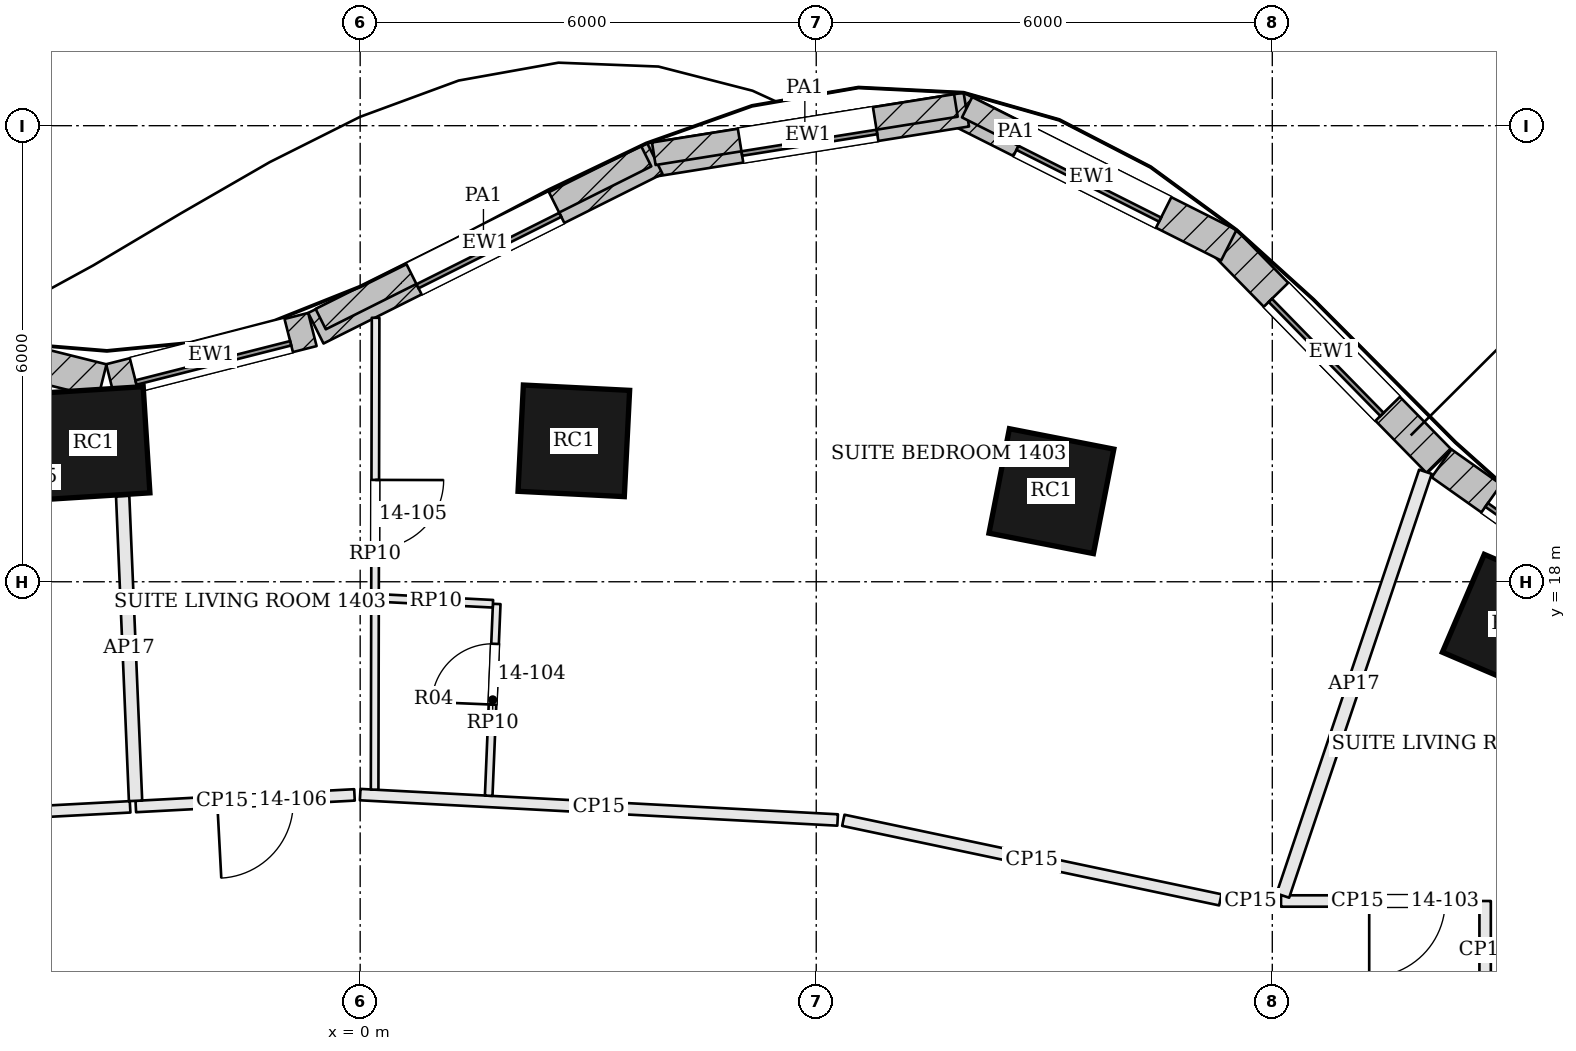
"""IFC4 building model, lengths in metres.
Left out: names, types, materials, properties, quantities, classifications, styles, units other than length and angle.
Written with IfcOpenShell. Run it as: python <this file> out.ifc"""

import sys

from ifc_helpers import new_model, si_unit, direction, frame, frame_2d, origin, origin_2d, place, context, subcontext, project, spatial, rectangle, extrude, element, fill, save


model = new_model("IFC4")
c1 = context("Model", 3, precision=1e-05, world=origin(), true_north=direction((0.0, 1.0)))
c2 = subcontext(c1, "Body", "Model", "MODEL_VIEW")
j1 = project(units=[si_unit("LENGTHUNIT", "METRE"), si_unit("PLANEANGLEUNIT", "RADIAN")], contexts=[c1])
p1 = place(None, origin())
s1 = spatial("IfcSite", under=j1, at=p1, CompositionType="ELEMENT")
p2 = place(p1, origin())
s2 = spatial("IfcBuilding", under=s1, at=p2, CompositionType="ELEMENT")
p3 = place(p2, frame((0.0, 0.0, 66.3)))
s3 = spatial("IfcBuildingStorey", under=s2, at=p3, CompositionType="ELEMENT", Elevation=66.3)
for number, where, z_axis, x_axis in (
    (1, (15.157, 17.441, 0.0), (0.0, 0.0, 1.0), (-0.919, 0.394, 0.0)),
    (2, (9.094, 19.192, 0.0), (0.0, 0.0, 1.0), (-0.981, 0.192, 0.0)),
    (3, (2.811, 19.854, 0.0), (0.0, 0.0, 1.0), (-0.999, 0.05, 0.0)),
    (4, (-3.509, 19.824, 0.0), (0.0, 0.0, 1.0), (-0.998, -0.063, 0.0)),
):
    element("IfcColumn", number, at=place(p3, frame(where, z_axis=z_axis, x_axis=x_axis)), inside=s3, PredefinedType="COLUMN", context=c2, shape_type="SweptSolid", body=[
        extrude(rectangle(XDim=1.4, YDim=1.4, at=origin_2d()), origin(), (0.0, 0.0, 1.0), 3.6),
    ])
p4 = place(p3, frame((17.249, 17.422, 0.0), z_axis=(0.0, 0.0, 1.0), x_axis=(-0.816589291225, 0.577219134694, 0.0)))
e5 = element("IfcWall", 5, at=p4, inside=s3, PredefinedType="SOLIDWALL", context=c2, shape_type="SweptSolid", body=[
    extrude(rectangle(XDim=3.701, YDim=0.45, at=frame_2d((1.851, 0.0))), origin(), (0.0, 0.0, 1.0), 3.4),
])
p5 = place(p4, frame((0.801, 0.0, 0.9)))
e6 = element("IfcOpeningElement", 6, at=p5, cuts=e5, PredefinedType="OPENING", context=c2, shape_type="SweptSolid", body=[
    extrude(rectangle(XDim=2.1, YDim=2.0, at=frame_2d((1.05, 1.0))), frame((0.0, 0.235, 0.0), z_axis=(0.0, -1.0, 0.0), x_axis=(1.0, 0.0, 0.0)), (0.0, 0.0, 1.0), 0.47),
])
p6 = place(p3, frame((14.195, 19.584, 0.0), z_axis=(0.0, 0.0, 1.0), x_axis=(-0.69962350521, 0.714511687068, 0.0)))
e7 = element("IfcWall", 7, at=p6, inside=s3, PredefinedType="SOLIDWALL", context=c2, shape_type="SweptSolid", body=[
    extrude(rectangle(XDim=4.034, YDim=0.45, at=frame_2d((2.017, 0.0))), origin(), (0.0, 0.0, 1.0), 3.4),
])
p7 = place(p6, frame((0.967, 0.0, 0.9)))
e8 = element("IfcOpeningElement", 8, at=p7, cuts=e7, PredefinedType="OPENING", context=c2, shape_type="SweptSolid", body=[
    extrude(rectangle(XDim=2.1, YDim=2.0, at=frame_2d((1.05, 1.0))), frame((0.0, 0.235, 0.0), z_axis=(0.0, -1.0, 0.0), x_axis=(1.0, 0.0, 0.0)), (0.0, 0.0, 1.0), 0.47),
])
p8 = place(p3, frame((11.428, 22.427, 0.0), z_axis=(0.0, 0.0, 1.0), x_axis=(-0.893343208735, 0.449375023122, 0.0)))
e9 = element("IfcWall", 9, at=p8, inside=s3, PredefinedType="SOLIDWALL", context=c2, shape_type="SweptSolid", body=[
    extrude(rectangle(XDim=4.019, YDim=0.45, at=frame_2d((2.009, 0.0))), origin(), (0.0, 0.0, 1.0), 3.4),
])
p9 = place(p8, frame((0.959, 0.0, 0.9)))
e10 = element("IfcOpeningElement", 10, at=p9, cuts=e9, PredefinedType="OPENING", context=c2, shape_type="SweptSolid", body=[
    extrude(rectangle(XDim=2.1, YDim=2.0, at=frame_2d((1.05, 1.0))), frame((0.0, 0.235, 0.0), z_axis=(0.0, -1.0, 0.0), x_axis=(1.0, 0.0, 0.0)), (0.0, 0.0, 1.0), 0.47),
])
p10 = place(p3, frame((7.975, 24.212, 0.0), z_axis=(0.0, 0.0, 1.0), x_axis=(-0.987470607744, -0.157803038125, 0.0)))
e11 = element("IfcWall", 11, at=p10, inside=s3, PredefinedType="SOLIDWALL", context=c2, shape_type="SweptSolid", body=[
    extrude(rectangle(XDim=4.216, YDim=0.45, at=frame_2d((2.108, 0.0))), origin(), (0.0, 0.0, 1.0), 3.4),
])
p11 = place(p10, frame((1.208, 0.0, 0.9)))
e12 = element("IfcOpeningElement", 12, at=p11, cuts=e11, PredefinedType="OPENING", context=c2, shape_type="SweptSolid", body=[
    extrude(rectangle(XDim=1.8, YDim=2.0, at=frame_2d((0.9, 1.0))), frame((0.0, 0.235, 0.0), z_axis=(0.0, -1.0, 0.0), x_axis=(1.0, 0.0, 0.0)), (0.0, 0.0, 1.0), 0.47),
])
p12 = place(p3, frame((3.877, 23.568, 0.0), z_axis=(0.0, 0.0, 1.0), x_axis=(-0.894241088759, -0.447585606532, 0.0)))
e13 = element("IfcWall", 13, at=p12, inside=s3, PredefinedType="SOLIDWALL", context=c2, shape_type="SweptSolid", body=[
    extrude(rectangle(XDim=4.987, YDim=0.45, at=frame_2d((2.494, 0.0))), origin(), (0.0, 0.0, 1.0), 3.4),
])
p13 = place(p12, frame((1.444, 0.0, 0.9)))
e14 = element("IfcOpeningElement", 14, at=p13, cuts=e13, PredefinedType="OPENING", context=c2, shape_type="SweptSolid", body=[
    extrude(rectangle(XDim=2.1, YDim=2.0, at=frame_2d((1.05, 1.0))), frame((0.0, 0.235, 0.0), z_axis=(0.0, -1.0, 0.0), x_axis=(1.0, 0.0, 0.0)), (0.0, 0.0, 1.0), 0.47),
])
p14 = place(p3, frame((-0.628, 21.319, 0.0), z_axis=(0.0, 0.0, 1.0), x_axis=(-0.969240543873, -0.246115355295, 0.0)))
e15 = element("IfcWall", 15, at=p14, inside=s3, PredefinedType="SOLIDWALL", context=c2, shape_type="SweptSolid", body=[
    extrude(rectangle(XDim=2.743, YDim=0.45, at=frame_2d((1.372, 0.0))), origin(), (0.0, 0.0, 1.0), 3.4),
])
p15 = place(p14, frame((0.321, 0.0, 0.9)))
e16 = element("IfcOpeningElement", 16, at=p15, cuts=e15, PredefinedType="OPENING", context=c2, shape_type="SweptSolid", body=[
    extrude(rectangle(XDim=2.1, YDim=2.0, at=frame_2d((1.05, 1.0))), frame((0.0, 0.235, 0.0), z_axis=(0.0, -1.0, 0.0), x_axis=(1.0, 0.0, 0.0)), (0.0, 0.0, 1.0), 0.47),
])
p16 = place(p3, frame((-3.392, 20.642, 0.0), z_axis=(0.0, 0.0, 1.0), x_axis=(-0.970168229467, 0.242432684539, 0.0)))
e17 = element("IfcWall", 17, at=p16, inside=s3, PredefinedType="SOLIDWALL", context=c2, shape_type="SweptSolid", body=[
    extrude(rectangle(XDim=3.906, YDim=0.45, at=frame_2d((1.953, 0.0))), origin(), (0.0, 0.0, 1.0), 3.4),
])
p17 = place(p16, frame((0.903, 0.0, 0.9)))
e18 = element("IfcOpeningElement", 18, at=p17, cuts=e17, PredefinedType="OPENING", context=c2, shape_type="SweptSolid", body=[
    extrude(rectangle(XDim=2.1, YDim=2.0, at=frame_2d((1.05, 1.0))), frame((0.0, 0.235, 0.0), z_axis=(0.0, -1.0, 0.0), x_axis=(1.0, 0.0, 0.0)), (0.0, 0.0, 1.0), 0.47),
])
p18 = place(p3, frame((9.267, 23.598, 3.6), z_axis=(0.0, 0.0, 1.0), x_axis=(-0.893335936782, 0.449389479242, 0.0)))
e19 = element("IfcWall", 19, at=p18, inside=s3, PredefinedType="PARAPET", context=c2, shape_type="SweptSolid", body=[
    extrude(rectangle(XDim=1.435, YDim=0.3, at=frame_2d((0.718, 0.0))), origin(), (0.0, 0.0, 1.0), 1.1),
])
p19 = place(p3, frame((7.837, 24.266, 3.6), z_axis=(0.0, 0.0, 1.0), x_axis=(-0.987476564543, -0.157765758254, 0.0)))
e20 = element("IfcWall", 20, at=p19, inside=s3, PredefinedType="PARAPET", context=c2, shape_type="SweptSolid", body=[
    extrude(rectangle(XDim=4.025, YDim=0.3, at=frame_2d((2.012, 0.0))), origin(), (0.0, 0.0, 1.0), 1.1),
])
p20 = place(p3, frame((3.763, 23.599, 3.6), z_axis=(0.0, 0.0, 1.0), x_axis=(-0.894243576514, -0.447580636158, 0.0)))
e21 = element("IfcWall", 21, at=p20, inside=s3, PredefinedType="PARAPET", context=c2, shape_type="SweptSolid", body=[
    extrude(rectangle(XDim=4.789, YDim=0.3, at=frame_2d((2.394, 0.0))), origin(), (0.0, 0.0, 1.0), 1.1),
])
p21 = place(p3, frame((14.8, 12.502, 0.0), z_axis=(0.0, 0.0, 1.0), x_axis=(-0.000188040613, 0.99999998232, 0.0)))
e22 = element("IfcWall", 22, at=p21, inside=s3, PredefinedType="PARTITIONING", context=c2, shape_type="SweptSolid", body=[
    extrude(rectangle(XDim=1.298, YDim=0.15, at=frame_2d((0.649, 0.0))), origin(), (0.0, 0.0, 1.0), 2.68),
])
p22 = place(p3, frame((14.725, 13.8, 0.0), z_axis=(0.0, 0.0, 1.0), x_axis=(-1.0, 0.0, 0.0)))
e23 = element("IfcWall", 23, at=p22, inside=s3, PredefinedType="PARTITIONING", context=c2, shape_type="SweptSolid", body=[
    extrude(rectangle(XDim=2.61, YDim=0.15, at=frame_2d((1.305, 0.0))), origin(), (0.0, 0.0, 1.0), 2.68),
])
p23 = place(p22, frame((0.45, 0.0, 0.0)))
e24 = element("IfcOpeningElement", 24, at=p23, cuts=e23, PredefinedType="OPENING", context=c2, shape_type="SweptSolid", body=[
    extrude(rectangle(XDim=1.0, YDim=2.1, at=frame_2d((0.5, 1.05))), frame((0.0, 0.085, 0.0), z_axis=(0.0, -1.0, 0.0), x_axis=(1.0, 0.0, 0.0)), (0.0, 0.0, 1.0), 0.17),
])
p24 = place(p3, frame((14.014, 19.447, 0.0), z_axis=(0.0, 0.0, 1.0), x_axis=(-0.318853578383, -0.947803985828, 0.0)))
e25 = element("IfcWall", 25, at=p24, inside=s3, PredefinedType="PARTITIONING", context=c2, shape_type="SweptSolid", body=[
    extrude(rectangle(XDim=5.883, YDim=0.175, at=frame_2d((2.941, 0.0))), origin(), (0.0, 0.0, 1.0), 2.68),
])
p25 = place(p3, frame((12.04, 13.8, 0.0), z_axis=(0.0, 0.0, 1.0), x_axis=(-1.0, 0.0, 0.0)))
e26 = element("IfcWall", 26, at=p25, inside=s3, PredefinedType="PARTITIONING", context=c2, shape_type="SweptSolid", body=[
    extrude(rectangle(XDim=0.65, YDim=0.15, at=frame_2d((0.325, 0.0))), origin(), (0.0, 0.0, 1.0), 2.68),
])
p26 = place(p3, frame((11.316, 13.815, 0.0), z_axis=(0.0, 0.0, 1.0), x_axis=(-0.978460774853, 0.206432827025, 0.0)))
e27 = element("IfcWall", 27, at=p26, inside=s3, PredefinedType="PARTITIONING", context=c2, shape_type="SweptSolid", body=[
    extrude(rectangle(XDim=5.069, YDim=0.15, at=frame_2d((2.534, 0.0))), origin(), (0.0, 0.0, 1.0), 2.68),
])
p27 = place(p3, frame((6.281, 14.866, 0.0), z_axis=(0.0, 0.0, 1.0), x_axis=(-0.998587429539, 0.053133281163, 0.0)))
e28 = element("IfcWall", 28, at=p27, inside=s3, PredefinedType="PARTITIONING", context=c2, shape_type="SweptSolid", body=[
    extrude(rectangle(XDim=6.29, YDim=0.15, at=frame_2d((3.145, 0.0))), origin(), (0.0, 0.0, 1.0), 2.68),
])
p28 = place(p3, frame((-0.075, 15.196, 0.0), z_axis=(0.0, 0.0, 1.0), x_axis=(-0.998591959352, -0.053048079307, 0.0)))
e29 = element("IfcWall", 29, at=p28, inside=s3, PredefinedType="PARTITIONING", context=c2, shape_type="SweptSolid", body=[
    extrude(rectangle(XDim=2.881, YDim=0.15, at=frame_2d((1.44, 0.0))), origin(), (0.0, 0.0, 1.0), 2.68),
])
p29 = place(p28, frame((0.808, 0.0, 0.0)))
e30 = element("IfcOpeningElement", 30, at=p29, cuts=e29, PredefinedType="OPENING", context=c2, shape_type="SweptSolid", body=[
    extrude(rectangle(XDim=1.0, YDim=2.1, at=frame_2d((0.5, 1.05))), frame((0.0, 0.085, 0.0), z_axis=(0.0, -1.0, 0.0), x_axis=(1.0, 0.0, 0.0)), (0.0, 0.0, 1.0), 0.17),
])
p30 = place(p3, frame((-3.125, 19.127, 0.0), z_axis=(0.0, 0.0, 1.0), x_axis=(0.042285996913, -0.99910554721, 0.0)))
e31 = element("IfcWall", 31, at=p30, inside=s3, PredefinedType="PARTITIONING", context=c2, shape_type="SweptSolid", body=[
    extrude(rectangle(XDim=4.013, YDim=0.175, at=frame_2d((2.006, 0.0))), origin(), (0.0, 0.0, 1.0), 2.68),
])
p31 = place(p3, frame((-3.027, 15.039, 0.0), z_axis=(0.0, 0.0, 1.0), x_axis=(-0.998589773409, -0.053089212123, 0.0)))
e32 = element("IfcWall", 32, at=p31, inside=s3, PredefinedType="PARTITIONING", context=c2, shape_type="SweptSolid", body=[
    extrude(rectangle(XDim=3.334, YDim=0.15, at=frame_2d((1.667, 0.0))), origin(), (0.0, 0.0, 1.0), 2.68),
])
p32 = place(p3, frame((0.203, 21.473, 0.0), z_axis=(0.0, 0.0, 1.0), x_axis=(-0.002044985499, -0.999997909015, 0.0)))
e33 = element("IfcWall", 33, at=p32, inside=s3, PredefinedType="PARTITIONING", context=c2, shape_type="SweptSolid", body=[
    extrude(rectangle(XDim=6.208, YDim=0.1, at=frame_2d((3.104, 0.0))), origin(), (0.0, 0.0, 1.0), 2.68),
])
p33 = place(p32, frame((2.133, 0.0, 0.0)))
e34 = element("IfcOpeningElement", 34, at=p33, cuts=e33, PredefinedType="OPENING", context=c2, shape_type="SweptSolid", body=[
    extrude(rectangle(XDim=0.9, YDim=2.4, at=frame_2d((0.45, 1.2))), frame((0.0, 0.06, 0.0), z_axis=(0.0, -1.0, 0.0), x_axis=(1.0, 0.0, 0.0)), (0.0, 0.0, 1.0), 0.12),
])
p34 = place(p3, frame((1.691, 15.185, 0.0), z_axis=(0.0, 0.0, 1.0), x_axis=(0.041767275245, 0.999127366615, 0.0)))
e35 = element("IfcWall", 35, at=p34, inside=s3, PredefinedType="PARTITIONING", context=c2, shape_type="SweptSolid", body=[
    extrude(rectangle(XDim=2.525, YDim=0.1, at=frame_2d((1.263, 0.0))), origin(), (0.0, 0.0, 1.0), 2.68),
])
p35 = place(p34, frame((1.2, 0.0, 0.0)))
e36 = element("IfcOpeningElement", 36, at=p35, cuts=e35, PredefinedType="OPENING", context=c2, shape_type="SweptSolid", body=[
    extrude(rectangle(XDim=0.8, YDim=2.1, at=frame_2d((0.4, 1.05))), frame((0.0, 0.06, 0.0), z_axis=(0.0, -1.0, 0.0), x_axis=(1.0, 0.0, 0.0)), (0.0, 0.0, 1.0), 0.12),
])
p36 = place(p3, frame((1.747, 17.71, 0.0), z_axis=(0.0, 0.0, 1.0), x_axis=(-0.998699138712, 0.050990492611, 0.0)))
e37 = element("IfcWall", 37, at=p36, inside=s3, PredefinedType="PARTITIONING", context=c2, shape_type="SweptSolid", body=[
    extrude(rectangle(XDim=1.503, YDim=0.1, at=frame_2d((0.752, 0.0))), origin(), (0.0, 0.0, 1.0), 2.68),
])
p37 = place(p5, origin())
e38 = element("IfcWindow", 38, at=p37, inside=s3, PartitioningType="SINGLE_PANEL", PredefinedType="WINDOW", context=c2, shape_type="SweptSolid", body=[
    extrude(rectangle(XDim=2.1, YDim=2.0, at=frame_2d((1.05, 1.0))), frame((0.0, 0.135, 0.0), z_axis=(0.0, -1.0, 0.0), x_axis=(1.0, 0.0, 0.0)), (0.0, 0.0, 1.0), 0.06),
])
fill(e6, e38)
p38 = place(p7, origin())
e39 = element("IfcWindow", 39, at=p38, inside=s3, PartitioningType="SINGLE_PANEL", PredefinedType="WINDOW", context=c2, shape_type="SweptSolid", body=[
    extrude(rectangle(XDim=2.1, YDim=2.0, at=frame_2d((1.05, 1.0))), frame((0.0, 0.135, 0.0), z_axis=(0.0, -1.0, 0.0), x_axis=(1.0, 0.0, 0.0)), (0.0, 0.0, 1.0), 0.06),
])
fill(e8, e39)
p39 = place(p9, origin())
e40 = element("IfcWindow", 40, at=p39, inside=s3, PartitioningType="SINGLE_PANEL", PredefinedType="WINDOW", context=c2, shape_type="SweptSolid", body=[
    extrude(rectangle(XDim=2.1, YDim=2.0, at=frame_2d((1.05, 1.0))), frame((0.0, 0.135, 0.0), z_axis=(0.0, -1.0, 0.0), x_axis=(1.0, 0.0, 0.0)), (0.0, 0.0, 1.0), 0.06),
])
fill(e10, e40)
p40 = place(p11, origin())
e41 = element("IfcWindow", 41, at=p40, inside=s3, PartitioningType="SINGLE_PANEL", PredefinedType="WINDOW", context=c2, shape_type="SweptSolid", body=[
    extrude(rectangle(XDim=1.8, YDim=2.0, at=frame_2d((0.9, 1.0))), frame((0.0, 0.135, 0.0), z_axis=(0.0, -1.0, 0.0), x_axis=(1.0, 0.0, 0.0)), (0.0, 0.0, 1.0), 0.06),
])
fill(e12, e41)
p41 = place(p13, origin())
e42 = element("IfcWindow", 42, at=p41, inside=s3, PartitioningType="SINGLE_PANEL", PredefinedType="WINDOW", context=c2, shape_type="SweptSolid", body=[
    extrude(rectangle(XDim=2.1, YDim=2.0, at=frame_2d((1.05, 1.0))), frame((0.0, 0.135, 0.0), z_axis=(0.0, -1.0, 0.0), x_axis=(1.0, 0.0, 0.0)), (0.0, 0.0, 1.0), 0.06),
])
fill(e14, e42)
p42 = place(p15, origin())
e43 = element("IfcWindow", 43, at=p42, inside=s3, PartitioningType="SINGLE_PANEL", PredefinedType="WINDOW", context=c2, shape_type="SweptSolid", body=[
    extrude(rectangle(XDim=2.1, YDim=2.0, at=frame_2d((1.05, 1.0))), frame((0.0, 0.135, 0.0), z_axis=(0.0, -1.0, 0.0), x_axis=(1.0, 0.0, 0.0)), (0.0, 0.0, 1.0), 0.06),
])
fill(e16, e43)
p43 = place(p23, origin())
e44 = element("IfcDoor", 44, at=p43, inside=s3, OperationType="SINGLE_SWING_RIGHT", PredefinedType="DOOR", context=c2, shape_type="SweptSolid", body=[
    extrude(rectangle(XDim=1.0, YDim=2.1, at=frame_2d((0.5, 1.05))), frame((0.0, 0.025, 0.0), z_axis=(0.0, -1.0, 0.0), x_axis=(1.0, 0.0, 0.0)), (0.0, 0.0, 1.0), 0.05),
])
fill(e24, e44)
p44 = place(p35, origin())
e45 = element("IfcDoor", 45, at=p44, inside=s3, OperationType="SINGLE_SWING_LEFT", PredefinedType="DOOR", context=c2, shape_type="SweptSolid", body=[
    extrude(rectangle(XDim=0.8, YDim=2.1, at=frame_2d((0.4, 1.05))), frame((0.0, 0.025, 0.0), z_axis=(0.0, -1.0, 0.0), x_axis=(1.0, 0.0, 0.0)), (0.0, 0.0, 1.0), 0.05),
])
fill(e36, e45)
p45 = place(p33, origin())
e46 = element("IfcDoor", 46, at=p45, inside=s3, OperationType="SINGLE_SWING_LEFT", PredefinedType="DOOR", context=c2, shape_type="SweptSolid", body=[
    extrude(rectangle(XDim=0.9, YDim=2.4, at=frame_2d((0.45, 1.2))), frame((0.0, 0.025, 0.0), z_axis=(0.0, -1.0, 0.0), x_axis=(1.0, 0.0, 0.0)), (0.0, 0.0, 1.0), 0.05),
])
fill(e34, e46)
p46 = place(p29, origin())
e47 = element("IfcDoor", 47, at=p46, inside=s3, OperationType="SINGLE_SWING_RIGHT", PredefinedType="DOOR", context=c2, shape_type="SweptSolid", body=[
    extrude(rectangle(XDim=1.0, YDim=2.1, at=frame_2d((0.5, 1.05))), frame((0.0, 0.025, 0.0), z_axis=(0.0, -1.0, 0.0), x_axis=(1.0, 0.0, 0.0)), (0.0, 0.0, 1.0), 0.05),
])
fill(e30, e47)
save(model, sys.argv[1])
